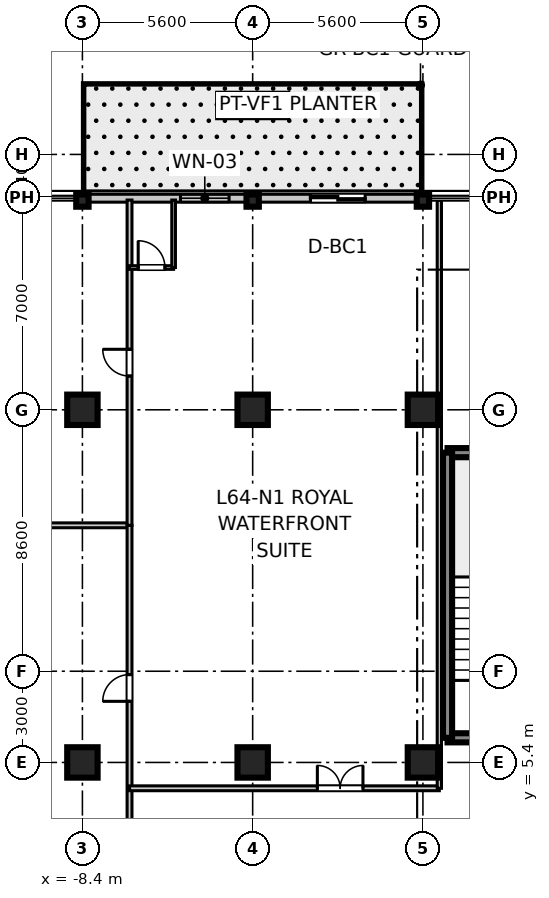
"""IFC4 building model, lengths in metres.
Left out: names, types, materials, properties, quantities, classifications, styles, units other than length and angle.
Written with IfcOpenShell. Run it as: python <this file> out.ifc"""

import sys

from ifc_helpers import new_model, si_unit, direction, frame, frame_2d, origin, origin_2d, place, context, subcontext, project, spatial, rectangle, i_section, extrude, source, transform, mapped, element, fill, save


model = new_model("IFC4")
c1 = context("Model", 3, precision=1e-05, world=origin(), true_north=direction((0.0, 1.0)))
c2 = subcontext(c1, "Body", "Model", "MODEL_VIEW")
j1 = project(units=[si_unit("LENGTHUNIT", "METRE"), si_unit("PLANEANGLEUNIT", "RADIAN")], contexts=[c1])
p1 = place(None, origin())
s1 = spatial("IfcSite", under=j1, at=p1, CompositionType="ELEMENT")
p2 = place(p1, origin())
s2 = spatial("IfcBuilding", under=s1, at=p2, CompositionType="ELEMENT")
p3 = place(p2, frame((0.0, 0.0, 249.3)))
s3 = spatial("IfcBuildingStorey", under=s2, at=p3, CompositionType="ELEMENT", Elevation=249.3)
m1 = source(origin(), c2, "Body", "SweptSolid", [
    extrude(rectangle(XDim=1.0, YDim=1.0, at=origin_2d()), origin(), (0.0, 0.0, 1.0), 3.655),
])
for number, where, z_axis, x_axis in (
    (1, (-8.4, 5.4, 0.0), (0.0, 0.0, 1.0), (1.0, 0.0, 0.0)),
    (2, (-8.4, 17.0, 0.0), (0.0, 0.0, 1.0), (1.0, 0.0, 0.0)),
    (3, (-2.8, 5.4, 0.0), (0.0, 0.0, 1.0), (1.0, 0.0, 0.0)),
    (4, (-2.8, 17.0, 0.0), (0.0, 0.0, 1.0), (1.0, 0.0, 0.0)),
    (5, (2.8, 5.4, 0.0), (0.0, 0.0, 1.0), (1.0, 0.0, 0.0)),
    (6, (2.8, 17.0, 0.0), (0.0, 0.0, 1.0), (1.0, 0.0, 0.0)),
):
    element("IfcColumn", number, at=place(p3, frame(where, z_axis=z_axis, x_axis=x_axis)), inside=s3, PredefinedType="COLUMN", context=c2, shape_type="MappedRepresentation", body=[
        mapped(m1, transform((0.0, 0.0, 0.0), scale=1.0)),
    ])
m2 = source(origin(), c2, "Body", "SweptSolid", [
    extrude(i_section(OverallWidth=0.401, OverallDepth=0.406, WebThickness=0.016, FlangeThickness=0.025, at=origin_2d()), origin(), (0.0, 0.0, 1.0), 3.655),
])
for number, where, z_axis, x_axis in (
    (7, (-8.4, 23.88, 0.0), (0.0, 0.0, 1.0), (0.0, 1.0, 0.0)),
    (8, (-2.8, 23.88, 0.0), (0.0, 0.0, 1.0), (0.0, 1.0, 0.0)),
    (9, (2.8, 23.88, 0.0), (0.0, 0.0, 1.0), (0.0, 1.0, 0.0)),
):
    element("IfcColumn", number, at=place(p3, frame(where, z_axis=z_axis, x_axis=x_axis)), inside=s3, PredefinedType="COLUMN", context=c2, shape_type="MappedRepresentation", body=[
        mapped(m2, transform((0.0, 0.0, 0.0), scale=1.0)),
    ])
m3 = source(origin(), c2, "Body", "SweptSolid", [
    extrude(rectangle(XDim=3.98, YDim=0.3, at=frame_2d((1.99, 0.0))), origin(), (0.0, 0.0, 1.0), 3.41),
])
for number, where, z_axis, x_axis in (
    (10, (3.61, 6.21, 0.0), (0.0, 0.0, 1.0), (1.0, 0.0, 0.0)),
    (11, (3.61, 15.59, 0.0), (0.0, 0.0, 1.0), (1.0, 0.0, 0.0)),
):
    element("IfcWall", number, at=place(p3, frame(where, z_axis=z_axis, x_axis=x_axis)), inside=s3, PredefinedType="SHEAR", context=c2, shape_type="MappedRepresentation", body=[
        mapped(m3, transform((0.0, 0.0, 0.0), scale=1.0)),
    ])
m4 = source(origin(), c2, "Body", "SweptSolid", [
    extrude(rectangle(XDim=9.38, YDim=0.3, at=frame_2d((4.69, 0.0))), origin(), (0.0, 0.0, 1.0), 3.41),
])
p4 = place(p3, frame((3.61, 6.21, 0.0), z_axis=(0.0, 0.0, 1.0), x_axis=(0.0, 1.0, 0.0)))
e12 = element("IfcWall", 12, at=p4, inside=s3, PredefinedType="SHEAR", context=c2, shape_type="MappedRepresentation", body=[
    mapped(m4, transform((0.0, 0.0, 0.0), scale=1.0)),
])
m5 = source(origin(), c2, "Body", "SweptSolid", [
    extrude(rectangle(XDim=11.2, YDim=0.26, at=frame_2d((5.6, 0.0))), origin(), (0.0, 0.0, 1.0), 2.89),
])
p5 = place(p3, frame((-8.4, 23.96, 0.0), z_axis=(0.0, 0.0, 1.0), x_axis=(1.0, 0.0, 0.0)))
e13 = element("IfcWall", 13, at=p5, inside=s3, PredefinedType="STANDARD", context=c2, shape_type="MappedRepresentation", body=[
    mapped(m5, transform((0.0, 0.0, 0.0), scale=1.0)),
])
p6 = place(p5, frame((7.5, 0.0, 0.0)))
e14 = element("IfcOpeningElement", 14, at=p6, cuts=e13, PredefinedType="OPENING", context=c2, shape_type="SweptSolid", body=[
    extrude(rectangle(XDim=1.8, YDim=2.25, at=frame_2d((0.9, 1.125))), frame((0.0, 0.14, 0.0), z_axis=(0.0, -1.0, 0.0), x_axis=(1.0, 0.0, 0.0)), (0.0, 0.0, 1.0), 0.28),
])
p7 = place(p5, frame((3.225, 0.0, 0.85)))
e15 = element("IfcOpeningElement", 15, at=p7, cuts=e13, PredefinedType="OPENING", context=c2, shape_type="SweptSolid", body=[
    extrude(rectangle(XDim=1.6, YDim=1.8, at=frame_2d((0.8, 0.9))), frame((0.0, 0.14, 0.0), z_axis=(0.0, -1.0, 0.0), x_axis=(1.0, 0.0, 0.0)), (0.0, 0.0, 1.0), 0.28),
])
m6 = source(origin(), c2, "Body", "SweptSolid", [
    extrude(rectangle(XDim=14.31, YDim=0.16, at=frame_2d((7.155, 0.0))), origin(), (0.0, 0.0, 1.0), 2.75),
])
p8 = place(p3, frame((-21.16, 13.2, 0.0), z_axis=(0.0, 0.0, 1.0), x_axis=(1.0, 0.0, 0.0)))
e16 = element("IfcWall", 16, at=p8, inside=s3, PredefinedType="PARTITIONING", context=c2, shape_type="MappedRepresentation", body=[
    mapped(m6, transform((0.0, 0.0, 0.0), scale=1.0)),
])
m7 = source(origin(), c2, "Body", "SweptSolid", [
    extrude(rectangle(XDim=10.7, YDim=0.16, at=frame_2d((5.35, 0.0))), origin(), (0.0, 0.0, 1.0), 2.75),
])
p9 = place(p3, frame((-6.85, 2.5, 0.0), z_axis=(0.0, 0.0, 1.0), x_axis=(0.0, 1.0, 0.0)))
e17 = element("IfcWall", 17, at=p9, inside=s3, PredefinedType="PARTITIONING", context=c2, shape_type="MappedRepresentation", body=[
    mapped(m7, transform((0.0, 0.0, 0.0), scale=1.0)),
])
p10 = place(p9, frame((4.91, 0.0, 0.0)))
e18 = element("IfcOpeningElement", 18, at=p10, cuts=e17, PredefinedType="OPENING", context=c2, shape_type="SweptSolid", body=[
    extrude(rectangle(XDim=0.88, YDim=2.1, at=frame_2d((0.44, 1.05))), frame((0.0, 0.09, 0.0), z_axis=(0.0, -1.0, 0.0), x_axis=(1.0, 0.0, 0.0)), (0.0, 0.0, 1.0), 0.18),
])
p11 = place(p3, frame((-6.85, 13.2, 0.0), z_axis=(0.0, 0.0, 1.0), x_axis=(0.0, 1.0, 0.0)))
e19 = element("IfcWall", 19, at=p11, inside=s3, PredefinedType="PARTITIONING", context=c2, shape_type="MappedRepresentation", body=[
    mapped(m7, transform((0.0, 0.0, 0.0), scale=1.0)),
])
p12 = place(p11, frame((4.91, 0.0, 0.0)))
e20 = element("IfcOpeningElement", 20, at=p12, cuts=e19, PredefinedType="OPENING", context=c2, shape_type="SweptSolid", body=[
    extrude(rectangle(XDim=0.88, YDim=2.1, at=frame_2d((0.44, 1.05))), frame((0.0, 0.09, 0.0), z_axis=(0.0, -1.0, 0.0), x_axis=(1.0, 0.0, 0.0)), (0.0, 0.0, 1.0), 0.18),
])
m8 = source(origin(), c2, "Body", "SweptSolid", [
    extrude(rectangle(XDim=10.19, YDim=0.16, at=frame_2d((5.095, 0.0))), origin(), (0.0, 0.0, 1.0), 2.75),
])
p13 = place(p3, frame((-6.85, 4.55, 0.0), z_axis=(0.0, 0.0, 1.0), x_axis=(1.0, 0.0, 0.0)))
e21 = element("IfcWall", 21, at=p13, inside=s3, PredefinedType="PARTITIONING", context=c2, shape_type="MappedRepresentation", body=[
    mapped(m8, transform((0.0, 0.0, 0.0), scale=1.0)),
])
p14 = place(p13, frame((6.178, 0.0, 0.0)))
e22 = element("IfcOpeningElement", 22, at=p14, cuts=e21, PredefinedType="OPENING", context=c2, shape_type="SweptSolid", body=[
    extrude(rectangle(XDim=1.5, YDim=2.15, at=frame_2d((0.75, 1.075))), frame((0.0, 0.09, 0.0), z_axis=(0.0, -1.0, 0.0), x_axis=(1.0, 0.0, 0.0)), (0.0, 0.0, 1.0), 0.18),
])
m9 = source(origin(), c2, "Body", "SweptSolid", [
    extrude(rectangle(XDim=19.35, YDim=0.14, at=frame_2d((9.675, 0.0))), origin(), (0.0, 0.0, 1.0), 2.75),
])
p15 = place(p3, frame((3.34, 4.55, 0.0), z_axis=(0.0, 0.0, 1.0), x_axis=(0.0, 1.0, 0.0)))
e23 = element("IfcWall", 23, at=p15, inside=s3, PredefinedType="PARTITIONING", context=c2, shape_type="MappedRepresentation", body=[
    mapped(m9, transform((0.0, 0.0, 0.0), scale=1.0)),
])
m10 = source(origin(), c2, "Body", "SweptSolid", [
    extrude(rectangle(XDim=1.45, YDim=0.12, at=frame_2d((0.725, 0.0))), origin(), (0.0, 0.0, 1.0), 2.75),
])
p16 = place(p3, frame((-6.85, 21.68, 0.0), z_axis=(0.0, 0.0, 1.0), x_axis=(1.0, 0.0, 0.0)))
e24 = element("IfcWall", 24, at=p16, inside=s3, PredefinedType="PARTITIONING", context=c2, shape_type="MappedRepresentation", body=[
    mapped(m10, transform((0.0, 0.0, 0.0), scale=1.0)),
])
p17 = place(p16, frame((0.285, 0.0, 0.0)))
e25 = element("IfcOpeningElement", 25, at=p17, cuts=e24, PredefinedType="OPENING", context=c2, shape_type="SweptSolid", body=[
    extrude(rectangle(XDim=0.88, YDim=2.1, at=frame_2d((0.44, 1.05))), frame((0.0, 0.07, 0.0), z_axis=(0.0, -1.0, 0.0), x_axis=(1.0, 0.0, 0.0)), (0.0, 0.0, 1.0), 0.14),
])
m11 = source(origin(), c2, "Body", "SweptSolid", [
    extrude(rectangle(XDim=2.22, YDim=0.12, at=frame_2d((1.11, 0.0))), origin(), (0.0, 0.0, 1.0), 2.75),
])
p18 = place(p3, frame((-5.4, 21.68, 0.0), z_axis=(0.0, 0.0, 1.0), x_axis=(0.0, 1.0, 0.0)))
e26 = element("IfcWall", 26, at=p18, inside=s3, PredefinedType="PARTITIONING", context=c2, shape_type="MappedRepresentation", body=[
    mapped(m11, transform((0.0, 0.0, 0.0), scale=1.0)),
])
m12 = source(origin(), c2, "Body", "SweptSolid", [
    extrude(rectangle(XDim=0.88, YDim=2.1, at=frame_2d((0.44, 1.05))), frame((0.0, 0.025, 0.0), z_axis=(0.0, -1.0, 0.0), x_axis=(1.0, 0.0, 0.0)), (0.0, 0.0, 1.0), 0.05),
])
p19 = place(p10, origin())
e27 = element("IfcDoor", 27, at=p19, inside=s3, OperationType="SINGLE_SWING_LEFT", PredefinedType="DOOR", context=c2, shape_type="MappedRepresentation", body=[
    mapped(m12, transform((0.0, 0.0, 0.0), scale=1.0)),
])
fill(e18, e27)
p20 = place(p12, origin())
e28 = element("IfcDoor", 28, at=p20, inside=s3, OperationType="SINGLE_SWING_RIGHT", PredefinedType="DOOR", context=c2, shape_type="MappedRepresentation", body=[
    mapped(m12, transform((0.0, 0.0, 0.0), scale=1.0)),
])
fill(e20, e28)
p21 = place(p17, origin())
e29 = element("IfcDoor", 29, at=p21, inside=s3, OperationType="SINGLE_SWING_LEFT", PredefinedType="DOOR", context=c2, shape_type="MappedRepresentation", body=[
    mapped(m12, transform((0.0, 0.0, 0.0), scale=1.0)),
])
fill(e25, e29)
m13 = source(origin(), c2, "Body", "SweptSolid", [
    extrude(rectangle(XDim=1.5, YDim=2.15, at=frame_2d((0.75, 1.075))), frame((0.0, 0.025, 0.0), z_axis=(0.0, -1.0, 0.0), x_axis=(1.0, 0.0, 0.0)), (0.0, 0.0, 1.0), 0.05),
])
p22 = place(p14, origin())
e30 = element("IfcDoor", 30, at=p22, inside=s3, OperationType="DOUBLE_DOOR_SINGLE_SWING", PredefinedType="DOOR", context=c2, shape_type="MappedRepresentation", body=[
    mapped(m13, transform((0.0, 0.0, 0.0), scale=1.0)),
])
fill(e22, e30)
m14 = source(origin(), c2, "Body", "SweptSolid", [
    extrude(rectangle(XDim=1.8, YDim=2.25, at=frame_2d((0.9, 1.125))), frame((0.0, 0.025, 0.0), z_axis=(0.0, -1.0, 0.0), x_axis=(1.0, 0.0, 0.0)), (0.0, 0.0, 1.0), 0.05),
])
p23 = place(p6, origin())
e31 = element("IfcDoor", 31, at=p23, inside=s3, OperationType="DOUBLE_DOOR_SLIDING", PredefinedType="DOOR", context=c2, shape_type="MappedRepresentation", body=[
    mapped(m14, transform((0.0, 0.0, 0.0), scale=1.0)),
])
fill(e14, e31)
m15 = source(origin(), c2, "Body", "SweptSolid", [
    extrude(rectangle(XDim=1.6, YDim=1.8, at=frame_2d((0.8, 0.9))), frame((0.0, 0.03, 0.0), z_axis=(0.0, -1.0, 0.0), x_axis=(1.0, 0.0, 0.0)), (0.0, 0.0, 1.0), 0.06),
])
p24 = place(p7, origin())
e32 = element("IfcWindow", 32, at=p24, inside=s3, PartitioningType="SINGLE_PANEL", PredefinedType="WINDOW", context=c2, shape_type="MappedRepresentation", body=[
    mapped(m15, transform((0.0, 0.0, 0.0), scale=1.0)),
])
fill(e15, e32)
save(model, sys.argv[1])
